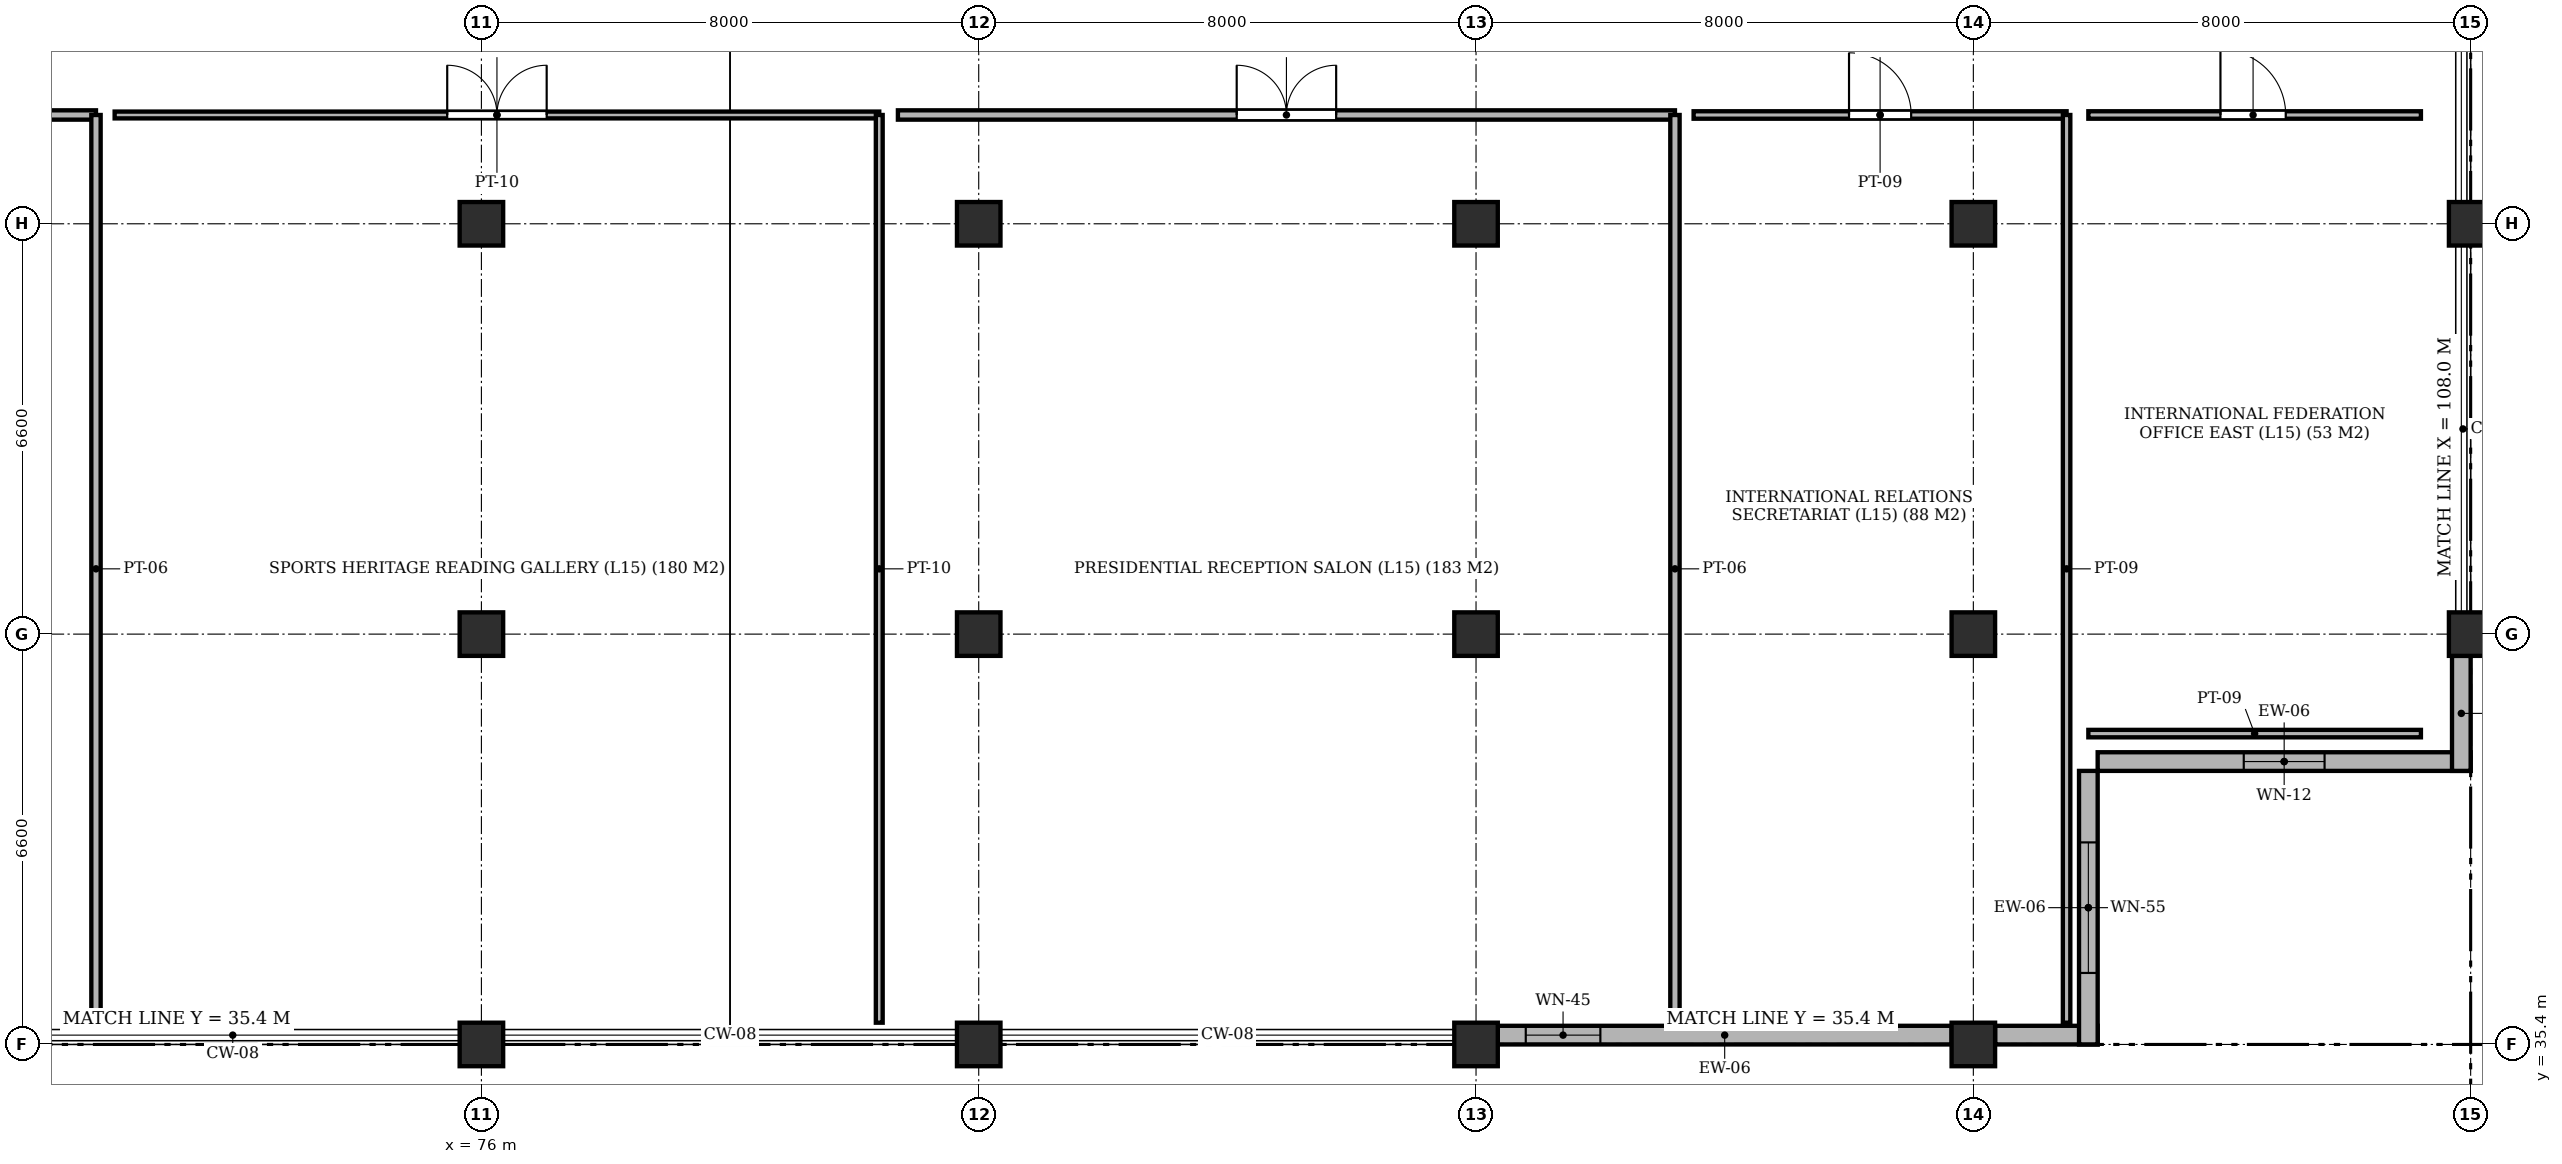
"""IFC4 building model, lengths in metres.
Left out: names, types, materials, properties, quantities, classifications, styles, units other than length and angle.
Written with IfcOpenShell. Run it as: python <this file> out.ifc"""

import sys

from ifc_helpers import new_model, si_unit, direction, frame, frame_2d, origin, origin_2d, place, context, subcontext, project, spatial, rectangle, extrude, element, fill, save


model = new_model("IFC4")
c1 = context("Model", 3, precision=1e-05, world=origin(), true_north=direction((0.0, 1.0)))
c2 = subcontext(c1, "Body", "Model", "MODEL_VIEW")
j1 = project(units=[si_unit("LENGTHUNIT", "METRE"), si_unit("PLANEANGLEUNIT", "RADIAN")], contexts=[c1])
p1 = place(None, origin())
s1 = spatial("IfcSite", under=j1, at=p1, CompositionType="ELEMENT")
p2 = place(p1, origin())
s2 = spatial("IfcBuilding", under=s1, at=p2, CompositionType="ELEMENT")
p3 = place(p2, frame((0.0, 0.0, 60.05)))
s3 = spatial("IfcBuildingStorey", under=s2, at=p3, CompositionType="ELEMENT", Elevation=60.05)
for number, where, z_axis, x_axis in (
    (1, (76.0, 35.4, -0.21), (0.0, 0.0, 1.0), (1.0, 0.0, 0.0)),
    (2, (76.0, 42.0, -0.21), (0.0, 0.0, 1.0), (1.0, 0.0, 0.0)),
    (3, (76.0, 48.6, -0.21), (0.0, 0.0, 1.0), (1.0, 0.0, 0.0)),
    (4, (84.0, 35.4, -0.21), (0.0, 0.0, 1.0), (1.0, 0.0, 0.0)),
    (5, (84.0, 42.0, -0.21), (0.0, 0.0, 1.0), (1.0, 0.0, 0.0)),
    (6, (84.0, 48.6, -0.21), (0.0, 0.0, 1.0), (1.0, 0.0, 0.0)),
    (7, (92.0, 35.4, -0.21), (0.0, 0.0, 1.0), (1.0, 0.0, 0.0)),
    (8, (92.0, 42.0, -0.21), (0.0, 0.0, 1.0), (1.0, 0.0, 0.0)),
    (9, (92.0, 48.6, -0.21), (0.0, 0.0, 1.0), (1.0, 0.0, 0.0)),
    (10, (100.0, 35.4, -0.21), (0.0, 0.0, 1.0), (1.0, 0.0, 0.0)),
    (11, (100.0, 42.0, -0.21), (0.0, 0.0, 1.0), (1.0, 0.0, 0.0)),
    (12, (100.0, 48.6, -0.21), (0.0, 0.0, 1.0), (1.0, 0.0, 0.0)),
    (13, (108.0, 42.0, -0.21), (0.0, 0.0, 1.0), (1.0, 0.0, 0.0)),
    (14, (108.0, 48.6, -0.21), (0.0, 0.0, 1.0), (1.0, 0.0, 0.0)),
):
    element("IfcColumn", number, at=place(p3, frame(where, z_axis=z_axis, x_axis=x_axis)), inside=s3, PredefinedType="COLUMN", context=c2, shape_type="SweptSolid", body=[
        extrude(rectangle(XDim=0.7, YDim=0.7, at=origin_2d()), origin(), (0.0, 0.0, 1.0), 3.25),
    ])
p4 = place(p3, frame((92.35, 35.55, 0.0), z_axis=(0.0, 0.0, 1.0), x_axis=(1.0, 0.0, 0.0)))
e15 = element("IfcWall", 15, at=p4, inside=s3, PredefinedType="SOLIDWALL", context=c2, shape_type="SweptSolid", body=[
    extrude(rectangle(XDim=7.3, YDim=0.3, at=frame_2d((3.65, 0.0))), origin(), (0.0, 0.0, 1.0), 2.53),
])
p5 = place(p4, frame((0.45, 0.0, 0.62)))
e16 = element("IfcOpeningElement", 16, at=p5, cuts=e15, PredefinedType="OPENING", context=c2, shape_type="SweptSolid", body=[
    extrude(rectangle(XDim=1.2, YDim=1.65, at=frame_2d((0.6, 0.825))), frame((0.0, 0.162, 0.0), z_axis=(0.0, -1.0, 0.0), x_axis=(1.0, 0.0, 0.0)), (0.0, 0.0, 1.0), 0.324),
])
p6 = place(p3, frame((100.35, 35.55, 0.0), z_axis=(0.0, 0.0, 1.0), x_axis=(1.0, 0.0, 0.0)))
e17 = element("IfcWall", 17, at=p6, inside=s3, PredefinedType="SOLIDWALL", context=c2, shape_type="SweptSolid", body=[
    extrude(rectangle(XDim=1.65, YDim=0.3, at=frame_2d((0.825, 0.0))), origin(), (0.0, 0.0, 1.0), 2.53),
])
p7 = place(p3, frame((101.85, 35.4, 0.0), z_axis=(0.0, 0.0, 1.0), x_axis=(0.0, 1.0, 0.0)))
e18 = element("IfcWall", 18, at=p7, inside=s3, PredefinedType="SOLIDWALL", context=c2, shape_type="SweptSolid", body=[
    extrude(rectangle(XDim=4.4, YDim=0.3, at=frame_2d((2.2, 0.0))), origin(), (0.0, 0.0, 1.0), 2.53),
])
p8 = place(p7, frame((1.15, 0.0, 0.62)))
e19 = element("IfcOpeningElement", 19, at=p8, cuts=e18, PredefinedType="OPENING", context=c2, shape_type="SweptSolid", body=[
    extrude(rectangle(XDim=2.1, YDim=1.81, at=frame_2d((1.05, 0.905))), frame((0.0, 0.162, 0.0), z_axis=(0.0, -1.0, 0.0), x_axis=(1.0, 0.0, 0.0)), (0.0, 0.0, 1.0), 0.324),
])
p9 = place(p3, frame((102.0, 39.95, 0.0), z_axis=(0.0, 0.0, 1.0), x_axis=(1.0, 0.0, 0.0)))
e20 = element("IfcWall", 20, at=p9, inside=s3, PredefinedType="SOLIDWALL", context=c2, shape_type="SweptSolid", body=[
    extrude(rectangle(XDim=6.0, YDim=0.3, at=frame_2d((3.0, 0.0))), origin(), (0.0, 0.0, 1.0), 2.53),
])
p10 = place(p9, frame((2.35, 0.0, 0.62)))
e21 = element("IfcOpeningElement", 21, at=p10, cuts=e20, PredefinedType="OPENING", context=c2, shape_type="SweptSolid", body=[
    extrude(rectangle(XDim=1.3, YDim=1.8, at=frame_2d((0.65, 0.9))), frame((0.0, 0.162, 0.0), z_axis=(0.0, -1.0, 0.0), x_axis=(1.0, 0.0, 0.0)), (0.0, 0.0, 1.0), 0.324),
])
p11 = place(p3, frame((107.85, 39.8, 0.0), z_axis=(0.0, 0.0, 1.0), x_axis=(0.0, 1.0, 0.0)))
e22 = element("IfcWall", 22, at=p11, inside=s3, PredefinedType="SOLIDWALL", context=c2, shape_type="SweptSolid", body=[
    extrude(rectangle(XDim=1.85, YDim=0.3, at=frame_2d((0.925, 0.0))), origin(), (0.0, 0.0, 1.0), 2.53),
])
p12 = place(p3, frame((59.0, 50.35, 0.0), z_axis=(0.0, 0.0, 1.0), x_axis=(1.0, 0.0, 0.0)))
e23 = element("IfcWall", 23, at=p12, inside=s3, PredefinedType="PARTITIONING", context=c2, shape_type="SweptSolid", body=[
    extrude(rectangle(XDim=10.8, YDim=0.15, at=frame_2d((5.4, 0.0))), origin(), (0.0, 0.0, 1.0), 2.53),
])
p13 = place(p12, frame((4.875, 0.0, 0.0)))
e24 = element("IfcOpeningElement", 24, at=p13, cuts=e23, PredefinedType="OPENING", context=c2, shape_type="SweptSolid", body=[
    extrude(rectangle(XDim=1.05, YDim=2.15, at=frame_2d((0.525, 1.075))), frame((0.0, 0.087, 0.0), z_axis=(0.0, -1.0, 0.0), x_axis=(1.0, 0.0, 0.0)), (0.0, 0.0, 1.0), 0.174),
])
p14 = place(p3, frame((69.8, 35.75, 0.0), z_axis=(0.0, 0.0, 1.0), x_axis=(0.0, 1.0, 0.0)))
e25 = element("IfcWall", 25, at=p14, inside=s3, PredefinedType="PARTITIONING", context=c2, shape_type="SweptSolid", body=[
    extrude(rectangle(XDim=14.6, YDim=0.15, at=frame_2d((7.3, 0.0))), origin(), (0.0, 0.0, 1.0), 2.53),
])
p15 = place(p3, frame((70.1, 50.35, 0.0), z_axis=(0.0, 0.0, 1.0), x_axis=(1.0, 0.0, 0.0)))
e26 = element("IfcWall", 26, at=p15, inside=s3, PredefinedType="PARTITIONING", context=c2, shape_type="SweptSolid", body=[
    extrude(rectangle(XDim=12.3, YDim=0.11, at=frame_2d((6.15, 0.0))), origin(), (0.0, 0.0, 1.0), 2.53),
])
p16 = place(p15, frame((5.35, 0.0, 0.0)))
e27 = element("IfcOpeningElement", 27, at=p16, cuts=e26, PredefinedType="OPENING", context=c2, shape_type="SweptSolid", body=[
    extrude(rectangle(XDim=1.6, YDim=2.2, at=frame_2d((0.8, 1.1))), frame((0.0, 0.067, 0.0), z_axis=(0.0, -1.0, 0.0), x_axis=(1.0, 0.0, 0.0)), (0.0, 0.0, 1.0), 0.134),
])
p17 = place(p3, frame((82.4, 35.75, 0.0), z_axis=(0.0, 0.0, 1.0), x_axis=(0.0, 1.0, 0.0)))
e28 = element("IfcWall", 28, at=p17, inside=s3, PredefinedType="PARTITIONING", context=c2, shape_type="SweptSolid", body=[
    extrude(rectangle(XDim=14.6, YDim=0.11, at=frame_2d((7.3, 0.0))), origin(), (0.0, 0.0, 1.0), 2.53),
])
p18 = place(p3, frame((82.7, 50.35, 0.0), z_axis=(0.0, 0.0, 1.0), x_axis=(1.0, 0.0, 0.0)))
e29 = element("IfcWall", 29, at=p18, inside=s3, PredefinedType="PARTITIONING", context=c2, shape_type="SweptSolid", body=[
    extrude(rectangle(XDim=12.5, YDim=0.15, at=frame_2d((6.25, 0.0))), origin(), (0.0, 0.0, 1.0), 2.53),
])
p19 = place(p18, frame((5.45, 0.0, 0.0)))
e30 = element("IfcOpeningElement", 30, at=p19, cuts=e29, PredefinedType="OPENING", context=c2, shape_type="SweptSolid", body=[
    extrude(rectangle(XDim=1.6, YDim=2.2, at=frame_2d((0.8, 1.1))), frame((0.0, 0.087, 0.0), z_axis=(0.0, -1.0, 0.0), x_axis=(1.0, 0.0, 0.0)), (0.0, 0.0, 1.0), 0.174),
])
p20 = place(p3, frame((95.2, 35.75, 0.0), z_axis=(0.0, 0.0, 1.0), x_axis=(0.0, 1.0, 0.0)))
e31 = element("IfcWall", 31, at=p20, inside=s3, PredefinedType="PARTITIONING", context=c2, shape_type="SweptSolid", body=[
    extrude(rectangle(XDim=14.6, YDim=0.15, at=frame_2d((7.3, 0.0))), origin(), (0.0, 0.0, 1.0), 2.53),
])
p21 = place(p3, frame((95.5, 50.35, 0.0), z_axis=(0.0, 0.0, 1.0), x_axis=(1.0, 0.0, 0.0)))
e32 = element("IfcWall", 32, at=p21, inside=s3, PredefinedType="PARTITIONING", context=c2, shape_type="SweptSolid", body=[
    extrude(rectangle(XDim=6.0, YDim=0.12, at=frame_2d((3.0, 0.0))), origin(), (0.0, 0.0, 1.0), 2.53),
])
p22 = place(p21, frame((2.5, 0.0, 0.0)))
e33 = element("IfcOpeningElement", 33, at=p22, cuts=e32, PredefinedType="OPENING", context=c2, shape_type="SweptSolid", body=[
    extrude(rectangle(XDim=1.0, YDim=2.15, at=frame_2d((0.5, 1.075))), frame((0.0, 0.072, 0.0), z_axis=(0.0, -1.0, 0.0), x_axis=(1.0, 0.0, 0.0)), (0.0, 0.0, 1.0), 0.144),
])
p23 = place(p3, frame((101.5, 35.75, 0.0), z_axis=(0.0, 0.0, 1.0), x_axis=(0.0, 1.0, 0.0)))
e34 = element("IfcWall", 34, at=p23, inside=s3, PredefinedType="PARTITIONING", context=c2, shape_type="SweptSolid", body=[
    extrude(rectangle(XDim=14.6, YDim=0.12, at=frame_2d((7.3, 0.0))), origin(), (0.0, 0.0, 1.0), 2.53),
])
p24 = place(p3, frame((101.85, 40.4, 0.0), z_axis=(0.0, 0.0, 1.0), x_axis=(1.0, 0.0, 0.0)))
e35 = element("IfcWall", 35, at=p24, inside=s3, PredefinedType="PARTITIONING", context=c2, shape_type="SweptSolid", body=[
    extrude(rectangle(XDim=5.35, YDim=0.12, at=frame_2d((2.675, 0.0))), origin(), (0.0, 0.0, 1.0), 2.53),
])
p25 = place(p3, frame((101.85, 50.35, 0.0), z_axis=(0.0, 0.0, 1.0), x_axis=(1.0, 0.0, 0.0)))
e36 = element("IfcWall", 36, at=p25, inside=s3, PredefinedType="PARTITIONING", context=c2, shape_type="SweptSolid", body=[
    extrude(rectangle(XDim=5.35, YDim=0.12, at=frame_2d((2.675, 0.0))), origin(), (0.0, 0.0, 1.0), 2.53),
])
p26 = place(p25, frame((2.125, 0.0, 0.0)))
e37 = element("IfcOpeningElement", 37, at=p26, cuts=e36, PredefinedType="OPENING", context=c2, shape_type="SweptSolid", body=[
    extrude(rectangle(XDim=1.05, YDim=2.15, at=frame_2d((0.525, 1.075))), frame((0.0, 0.072, 0.0), z_axis=(0.0, -1.0, 0.0), x_axis=(1.0, 0.0, 0.0)), (0.0, 0.0, 1.0), 0.144),
])
p27 = place(p5, origin())
e38 = element("IfcWindow", 38, at=p27, inside=s3, PartitioningType="SINGLE_PANEL", PredefinedType="WINDOW", context=c2, shape_type="SweptSolid", body=[
    extrude(rectangle(XDim=1.2, YDim=1.65, at=frame_2d((0.6, 0.825))), frame((0.0, 0.03, 0.0), z_axis=(0.0, -1.0, 0.0), x_axis=(1.0, 0.0, 0.0)), (0.0, 0.0, 1.0), 0.06),
])
fill(e16, e38)
p28 = place(p8, origin())
e39 = element("IfcWindow", 39, at=p28, inside=s3, PartitioningType="SINGLE_PANEL", PredefinedType="WINDOW", context=c2, shape_type="SweptSolid", body=[
    extrude(rectangle(XDim=2.1, YDim=1.81, at=frame_2d((1.05, 0.905))), frame((0.0, 0.03, 0.0), z_axis=(0.0, -1.0, 0.0), x_axis=(1.0, 0.0, 0.0)), (0.0, 0.0, 1.0), 0.06),
])
fill(e19, e39)
p29 = place(p10, origin())
e40 = element("IfcWindow", 40, at=p29, inside=s3, PartitioningType="SINGLE_PANEL", PredefinedType="WINDOW", context=c2, shape_type="SweptSolid", body=[
    extrude(rectangle(XDim=1.3, YDim=1.8, at=frame_2d((0.65, 0.9))), frame((0.0, 0.03, 0.0), z_axis=(0.0, -1.0, 0.0), x_axis=(1.0, 0.0, 0.0)), (0.0, 0.0, 1.0), 0.06),
])
fill(e21, e40)
p30 = place(p16, origin())
e41 = element("IfcDoor", 41, at=p30, inside=s3, OperationType="DOUBLE_DOOR_SINGLE_SWING", PredefinedType="DOOR", context=c2, shape_type="SweptSolid", body=[
    extrude(rectangle(XDim=1.6, YDim=2.2, at=frame_2d((0.8, 1.1))), frame((0.0, 0.025, 0.0), z_axis=(0.0, -1.0, 0.0), x_axis=(1.0, 0.0, 0.0)), (0.0, 0.0, 1.0), 0.05),
])
fill(e27, e41)
p31 = place(p19, origin())
e42 = element("IfcDoor", 42, at=p31, inside=s3, OperationType="DOUBLE_DOOR_SINGLE_SWING", PredefinedType="DOOR", context=c2, shape_type="SweptSolid", body=[
    extrude(rectangle(XDim=1.6, YDim=2.2, at=frame_2d((0.8, 1.1))), frame((0.0, 0.025, 0.0), z_axis=(0.0, -1.0, 0.0), x_axis=(1.0, 0.0, 0.0)), (0.0, 0.0, 1.0), 0.05),
])
fill(e30, e42)
p32 = place(p22, origin())
e43 = element("IfcDoor", 43, at=p32, inside=s3, OperationType="SINGLE_SWING_LEFT", PredefinedType="DOOR", context=c2, shape_type="SweptSolid", body=[
    extrude(rectangle(XDim=1.0, YDim=2.15, at=frame_2d((0.5, 1.075))), frame((0.0, 0.025, 0.0), z_axis=(0.0, -1.0, 0.0), x_axis=(1.0, 0.0, 0.0)), (0.0, 0.0, 1.0), 0.05),
])
fill(e33, e43)
p33 = place(p26, origin())
e44 = element("IfcDoor", 44, at=p33, inside=s3, OperationType="SINGLE_SWING_LEFT", PredefinedType="DOOR", context=c2, shape_type="SweptSolid", body=[
    extrude(rectangle(XDim=1.05, YDim=2.15, at=frame_2d((0.525, 1.075))), frame((0.0, 0.025, 0.0), z_axis=(0.0, -1.0, 0.0), x_axis=(1.0, 0.0, 0.0)), (0.0, 0.0, 1.0), 0.05),
])
fill(e37, e44)
save(model, sys.argv[1])
